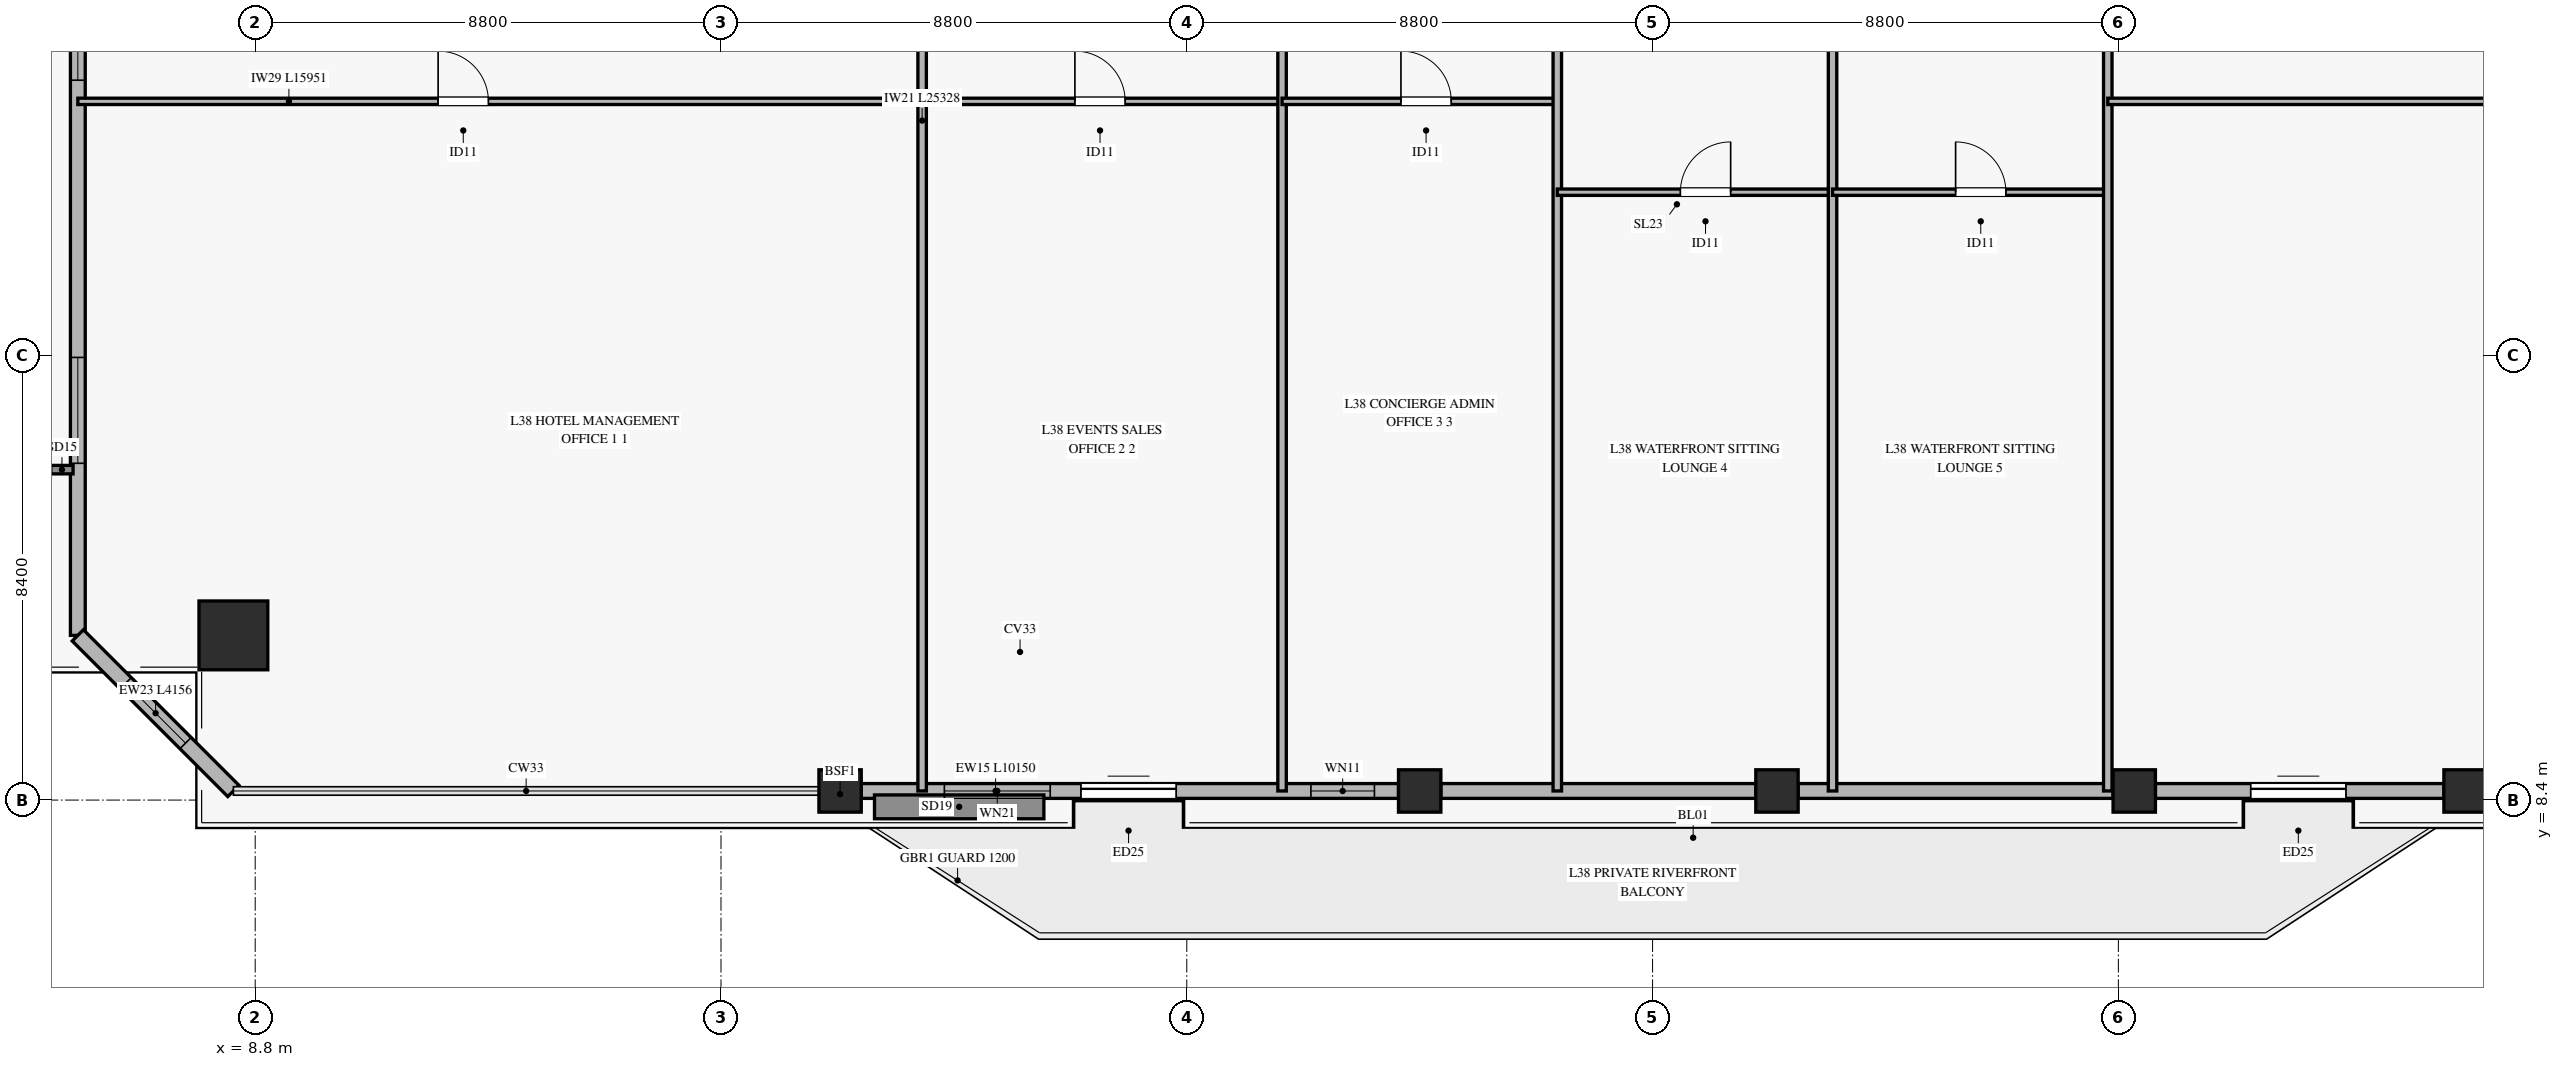
"""IFC4 building model, lengths in metres.
Left out: names, types, materials, properties, quantities, classifications, styles, units other than length and angle.
Written with IfcOpenShell. Run it as: python <this file> out.ifc"""

import sys

from ifc_helpers import new_model, si_unit, direction, frame, frame_2d, origin, origin_2d, place, context, subcontext, project, spatial, rectangle, hollow_rectangle, extrude, source, transform, mapped, element, fill, save


model = new_model("IFC4")
c1 = context("Model", 3, precision=1e-05, world=origin(), true_north=direction((0.0, 1.0)))
c2 = subcontext(c1, "Body", "Model", "MODEL_VIEW")
j1 = project(units=[si_unit("LENGTHUNIT", "METRE"), si_unit("PLANEANGLEUNIT", "RADIAN")], contexts=[c1])
p1 = place(None, origin())
s1 = spatial("IfcSite", under=j1, at=p1, CompositionType="ELEMENT")
p2 = place(p1, origin())
s2 = spatial("IfcBuilding", under=s1, at=p2, CompositionType="ELEMENT")
p3 = place(p2, frame((0.0, 0.0, 156.2)))
s3 = spatial("IfcBuildingStorey", under=s2, at=p3, CompositionType="ELEMENT", Elevation=156.2)
m1 = source(origin(), c2, "Body", "SweptSolid", [
    extrude(hollow_rectangle(XDim=1.3, YDim=1.3, WallThickness=0.06, at=origin_2d()), origin(), (0.0, 0.0, 1.0), 3.315),
])
p4 = place(p3, frame((8.388, 11.511, 0.0), z_axis=(0.063049281267, 0.150846878546, 0.986544478148), x_axis=(-0.922649834668, 0.385638798084, 0.0)))
e1 = element("IfcColumn", 1, at=p4, inside=s3, PredefinedType="COLUMN", context=c2, shape_type="MappedRepresentation", body=[
    mapped(m1, transform((0.0, 0.0, 0.0), x_axis=(1.0, 0.0, 0.0), y_axis=(0.0, 1.0, 0.0), z_axis=(0.0, 0.0, 1.0), scale=1.0)),
])
m2 = source(origin(), c2, "Body", "SweptSolid", [
    extrude(hollow_rectangle(XDim=0.8, YDim=0.8, WallThickness=0.036, at=origin_2d()), origin(), (0.0, 0.0, 1.0), 3.312),
])
for number, where, z_axis, x_axis in (
    (2, (19.85, 8.572, 0.0), (0.0, 0.159, 0.987), (-1.0, 0.0, 0.0)),
    (3, (30.8, 8.572, 0.0), (0.0, 0.159, 0.987), (-1.0, 0.0, 0.0)),
    (4, (37.55, 8.572, 0.0), (0.0, 0.159, 0.987), (-1.0, 0.0, 0.0)),
    (5, (44.3, 8.572, 0.0), (0.0, 0.159, 0.987), (-1.0, 0.0, 0.0)),
    (6, (50.55, 8.572, 0.0), (0.0, 0.159, 0.987), (-1.0, 0.0, 0.0)),
):
    element("IfcColumn", number, at=place(p3, frame(where, z_axis=z_axis, x_axis=x_axis)), inside=s3, PredefinedType="COLUMN", context=c2, shape_type="MappedRepresentation", body=[
        mapped(m2, transform((0.0, 0.0, 0.0), x_axis=(1.0, 0.0, 0.0), y_axis=(0.0, 1.0, 0.0), z_axis=(0.0, 0.0, 1.0), scale=1.0)),
    ])
p5 = place(p3, frame((20.25, 8.572, 0.0), z_axis=(0.0, 0.0, 1.0), x_axis=(1.0, 0.0, 0.0)))
e7 = element("IfcWall", 7, at=p5, inside=s3, PredefinedType="SOLIDWALL", context=c2, shape_type="SweptSolid", body=[
    extrude(rectangle(XDim=10.15, YDim=0.28, at=frame_2d((5.075, 0.0))), origin(), (0.0, 0.0, 1.0), 2.75),
])
p6 = place(p5, frame((4.15, 0.0, 0.0)))
e8 = element("IfcOpeningElement", 8, at=p6, cuts=e7, PredefinedType="OPENING", context=c2, shape_type="SweptSolid", body=[
    extrude(rectangle(XDim=1.8, YDim=2.25, at=frame_2d((0.9, 1.125))), frame((0.0, 0.15, 0.0), z_axis=(0.0, -1.0, 0.0), x_axis=(1.0, 0.0, 0.0)), (0.0, 0.0, 1.0), 0.3),
])
p7 = place(p5, frame((1.57, 0.0, 0.45)))
e9 = element("IfcOpeningElement", 9, at=p7, cuts=e7, PredefinedType="OPENING", context=c2, shape_type="SweptSolid", body=[
    extrude(rectangle(XDim=2.0, YDim=2.0, at=frame_2d((1.0, 1.0))), frame((0.0, 0.15, 0.0), z_axis=(0.0, -1.0, 0.0), x_axis=(1.0, 0.0, 0.0)), (0.0, 0.0, 1.0), 0.3),
])
p8 = place(p5, frame((8.495, 0.0, 0.45)))
e10 = element("IfcOpeningElement", 10, at=p8, cuts=e7, PredefinedType="OPENING", context=c2, shape_type="SweptSolid", body=[
    extrude(rectangle(XDim=1.2, YDim=2.0, at=frame_2d((0.6, 1.0))), frame((0.0, 0.15, 0.0), z_axis=(0.0, -1.0, 0.0), x_axis=(1.0, 0.0, 0.0)), (0.0, 0.0, 1.0), 0.3),
])
for number, where, z_axis, x_axis in (
    (11, (31.2, 8.572, 0.0), (0.0, 0.0, 1.0), (1.0, 0.0, 0.0)),
    (12, (37.95, 8.572, 0.0), (0.0, 0.0, 1.0), (1.0, 0.0, 0.0)),
):
    element("IfcWall", number, at=place(p3, frame(where, z_axis=z_axis, x_axis=x_axis)), inside=s3, PredefinedType="SOLIDWALL", context=c2, shape_type="SweptSolid", body=[
        extrude(rectangle(XDim=5.95, YDim=0.28, at=frame_2d((2.975, 0.0))), origin(), (0.0, 0.0, 1.0), 2.75),
    ])
p9 = place(p3, frame((44.7, 8.572, 0.0), z_axis=(0.0, 0.0, 1.0), x_axis=(1.0, 0.0, 0.0)))
e13 = element("IfcWall", 13, at=p9, inside=s3, PredefinedType="SOLIDWALL", context=c2, shape_type="SweptSolid", body=[
    extrude(rectangle(XDim=5.45, YDim=0.28, at=frame_2d((2.725, 0.0))), origin(), (0.0, 0.0, 1.0), 2.75),
])
p10 = place(p9, frame((1.8, 0.0, 0.0)))
e14 = element("IfcOpeningElement", 14, at=p10, cuts=e13, PredefinedType="OPENING", context=c2, shape_type="SweptSolid", body=[
    extrude(rectangle(XDim=1.8, YDim=2.25, at=frame_2d((0.9, 1.125))), frame((0.0, 0.15, 0.0), z_axis=(0.0, -1.0, 0.0), x_axis=(1.0, 0.0, 0.0)), (0.0, 0.0, 1.0), 0.3),
])
p11 = place(p3, frame((5.449, 11.511, 0.0), z_axis=(0.0, 0.0, 1.0), x_axis=(0.0, 1.0, 0.0)))
e15 = element("IfcWall", 15, at=p11, inside=s3, PredefinedType="SOLIDWALL", context=c2, shape_type="SweptSolid", body=[
    extrude(rectangle(XDim=15.425, YDim=0.28, at=frame_2d((7.712, 0.0))), origin(), (0.0, 0.0, 1.0), 2.75),
])
p12 = place(p11, frame((3.251, 0.0, 0.45)))
e16 = element("IfcOpeningElement", 16, at=p12, cuts=e15, PredefinedType="OPENING", context=c2, shape_type="SweptSolid", body=[
    extrude(rectangle(XDim=2.0, YDim=2.0, at=frame_2d((1.0, 1.0))), frame((0.0, 0.15, 0.0), z_axis=(0.0, -1.0, 0.0), x_axis=(1.0, 0.0, 0.0)), (0.0, 0.0, 1.0), 0.3),
])
p13 = place(p11, frame((10.488, 0.0, 0.45)))
e17 = element("IfcOpeningElement", 17, at=p13, cuts=e15, PredefinedType="OPENING", context=c2, shape_type="SweptSolid", body=[
    extrude(rectangle(XDim=2.0, YDim=2.0, at=frame_2d((1.0, 1.0))), frame((0.0, 0.15, 0.0), z_axis=(0.0, -1.0, 0.0), x_axis=(1.0, 0.0, 0.0)), (0.0, 0.0, 1.0), 0.3),
])
p14 = place(p3, frame((5.449, 11.511, 0.0), z_axis=(0.0, 0.0, 1.0), x_axis=(0.707106781187, -0.707106781187, 0.0)))
e18 = element("IfcWall", 18, at=p14, inside=s3, PredefinedType="SOLIDWALL", context=c2, shape_type="SweptSolid", body=[
    extrude(rectangle(XDim=4.156, YDim=0.3, at=frame_2d((2.078, 0.0))), origin(), (0.0, 0.0, 1.0), 2.75),
])
p15 = place(p14, frame((1.278, 0.0, 0.45)))
e19 = element("IfcOpeningElement", 19, at=p15, cuts=e18, PredefinedType="OPENING", context=c2, shape_type="SweptSolid", body=[
    extrude(rectangle(XDim=1.6, YDim=2.0, at=frame_2d((0.8, 1.0))), frame((0.0, 0.16, 0.0), z_axis=(0.0, -1.0, 0.0), x_axis=(1.0, 0.0, 0.0)), (0.0, 0.0, 1.0), 0.32),
])
p16 = place(p3, frame((5.449, 21.599, 0.0), z_axis=(0.0, 0.0, 1.0), x_axis=(1.0, 0.0, 0.0)))
e20 = element("IfcWall", 20, at=p16, inside=s3, PredefinedType="PARTITIONING", context=c2, shape_type="SweptSolid", body=[
    extrude(rectangle(XDim=15.951, YDim=0.12, at=frame_2d((7.976, 0.0))), origin(), (0.0, 0.0, 1.0), 2.455),
])
p17 = place(p16, frame((6.807, 0.0, 0.0)))
e21 = element("IfcOpeningElement", 21, at=p17, cuts=e20, PredefinedType="OPENING", context=c2, shape_type="SweptSolid", body=[
    extrude(rectangle(XDim=0.95, YDim=2.1, at=frame_2d((0.475, 1.05))), frame((0.0, 0.07, 0.0), z_axis=(0.0, -1.0, 0.0), x_axis=(1.0, 0.0, 0.0)), (0.0, 0.0, 1.0), 0.14),
])
p18 = place(p3, frame((21.4, 8.572, 0.0), z_axis=(0.0, 0.0, 1.0), x_axis=(0.0, 1.0, 0.0)))
e22 = element("IfcWall", 22, at=p18, inside=s3, PredefinedType="PARTITIONING", context=c2, shape_type="SweptSolid", body=[
    extrude(rectangle(XDim=25.328, YDim=0.16, at=frame_2d((12.664, 0.0))), origin(), (0.0, 0.0, 1.0), 2.755),
])
p19 = place(p3, frame((21.4, 21.599, 0.0), z_axis=(0.0, 0.0, 1.0), x_axis=(1.0, 0.0, 0.0)))
e23 = element("IfcWall", 23, at=p19, inside=s3, PredefinedType="PARTITIONING", context=c2, shape_type="SweptSolid", body=[
    extrude(rectangle(XDim=6.8, YDim=0.12, at=frame_2d((3.4, 0.0))), origin(), (0.0, 0.0, 1.0), 3.27),
])
p20 = place(p19, frame((2.886, 0.0, 0.0)))
e24 = element("IfcOpeningElement", 24, at=p20, cuts=e23, PredefinedType="OPENING", context=c2, shape_type="SweptSolid", body=[
    extrude(rectangle(XDim=0.95, YDim=2.1, at=frame_2d((0.475, 1.05))), frame((0.0, 0.07, 0.0), z_axis=(0.0, -1.0, 0.0), x_axis=(1.0, 0.0, 0.0)), (0.0, 0.0, 1.0), 0.14),
])
p21 = place(p3, frame((28.2, 8.572, 0.0), z_axis=(0.0, 0.0, 1.0), x_axis=(0.0, 1.0, 0.0)))
e25 = element("IfcWall", 25, at=p21, inside=s3, PredefinedType="PARTITIONING", context=c2, shape_type="SweptSolid", body=[
    extrude(rectangle(XDim=25.328, YDim=0.16, at=frame_2d((12.664, 0.0))), origin(), (0.0, 0.0, 1.0), 2.755),
])
p22 = place(p3, frame((28.2, 21.599, 0.0), z_axis=(0.0, 0.0, 1.0), x_axis=(1.0, 0.0, 0.0)))
e26 = element("IfcWall", 26, at=p22, inside=s3, PredefinedType="PARTITIONING", context=c2, shape_type="SweptSolid", body=[
    extrude(rectangle(XDim=5.2, YDim=0.12, at=frame_2d((2.6, 0.0))), origin(), (0.0, 0.0, 1.0), 2.455),
])
p23 = place(p22, frame((2.246, 0.0, 0.0)))
e27 = element("IfcOpeningElement", 27, at=p23, cuts=e26, PredefinedType="OPENING", context=c2, shape_type="SweptSolid", body=[
    extrude(rectangle(XDim=0.95, YDim=2.1, at=frame_2d((0.475, 1.05))), frame((0.0, 0.07, 0.0), z_axis=(0.0, -1.0, 0.0), x_axis=(1.0, 0.0, 0.0)), (0.0, 0.0, 1.0), 0.14),
])
p24 = place(p3, frame((33.4, 8.572, 0.0), z_axis=(0.0, 0.0, 1.0), x_axis=(0.0, 1.0, 0.0)))
e28 = element("IfcWall", 28, at=p24, inside=s3, PredefinedType="PARTITIONING", context=c2, shape_type="SweptSolid", body=[
    extrude(rectangle(XDim=25.328, YDim=0.16, at=frame_2d((12.664, 0.0))), origin(), (0.0, 0.0, 1.0), 2.755),
])
p25 = place(p3, frame((33.4, 19.883, 0.0), z_axis=(0.0, 0.0, 1.0), x_axis=(1.0, 0.0, 0.0)))
e29 = element("IfcWall", 29, at=p25, inside=s3, PredefinedType="PARTITIONING", context=c2, shape_type="SweptSolid", body=[
    extrude(rectangle(XDim=5.2, YDim=0.12, at=frame_2d((2.6, 0.0))), origin(), (0.0, 0.0, 1.0), 2.455),
])
p26 = place(p25, frame((2.325, 0.0, 0.0)))
e30 = element("IfcOpeningElement", 30, at=p26, cuts=e29, PredefinedType="OPENING", context=c2, shape_type="SweptSolid", body=[
    extrude(rectangle(XDim=0.95, YDim=2.1, at=frame_2d((0.475, 1.05))), frame((0.0, 0.07, 0.0), z_axis=(0.0, -1.0, 0.0), x_axis=(1.0, 0.0, 0.0)), (0.0, 0.0, 1.0), 0.14),
])
p27 = place(p3, frame((38.6, 8.572, 0.0), z_axis=(0.0, 0.0, 1.0), x_axis=(0.0, 1.0, 0.0)))
e31 = element("IfcWall", 31, at=p27, inside=s3, PredefinedType="PARTITIONING", context=c2, shape_type="SweptSolid", body=[
    extrude(rectangle(XDim=25.328, YDim=0.16, at=frame_2d((12.664, 0.0))), origin(), (0.0, 0.0, 1.0), 2.755),
])
p28 = place(p3, frame((38.6, 19.883, 0.0), z_axis=(0.0, 0.0, 1.0), x_axis=(1.0, 0.0, 0.0)))
e32 = element("IfcWall", 32, at=p28, inside=s3, PredefinedType="PARTITIONING", context=c2, shape_type="SweptSolid", body=[
    extrude(rectangle(XDim=5.2, YDim=0.12, at=frame_2d((2.6, 0.0))), origin(), (0.0, 0.0, 1.0), 3.27),
])
p29 = place(p28, frame((2.325, 0.0, 0.0)))
e33 = element("IfcOpeningElement", 33, at=p29, cuts=e32, PredefinedType="OPENING", context=c2, shape_type="SweptSolid", body=[
    extrude(rectangle(XDim=0.95, YDim=2.1, at=frame_2d((0.475, 1.05))), frame((0.0, 0.07, 0.0), z_axis=(0.0, -1.0, 0.0), x_axis=(1.0, 0.0, 0.0)), (0.0, 0.0, 1.0), 0.14),
])
p30 = place(p3, frame((43.8, 8.572, 0.0), z_axis=(0.0, 0.0, 1.0), x_axis=(0.0, 1.0, 0.0)))
e34 = element("IfcWall", 34, at=p30, inside=s3, PredefinedType="PARTITIONING", context=c2, shape_type="SweptSolid", body=[
    extrude(rectangle(XDim=25.328, YDim=0.16, at=frame_2d((12.664, 0.0))), origin(), (0.0, 0.0, 1.0), 2.755),
])
p31 = place(p3, frame((43.8, 21.599, 0.0), z_axis=(0.0, 0.0, 1.0), x_axis=(1.0, 0.0, 0.0)))
e35 = element("IfcWall", 35, at=p31, inside=s3, PredefinedType="PARTITIONING", context=c2, shape_type="SweptSolid", body=[
    extrude(rectangle(XDim=21.151, YDim=0.12, at=frame_2d((10.575, 0.0))), origin(), (0.0, 0.0, 1.0), 2.455),
])
p32 = place(p31, frame((8.452, 0.0, 0.0)))
e36 = element("IfcOpeningElement", 36, at=p32, cuts=e35, PredefinedType="OPENING", context=c2, shape_type="SweptSolid", body=[
    extrude(rectangle(XDim=0.95, YDim=2.1, at=frame_2d((0.475, 1.05))), frame((0.0, 0.07, 0.0), z_axis=(0.0, -1.0, 0.0), x_axis=(1.0, 0.0, 0.0)), (0.0, 0.0, 1.0), 0.14),
])
m3 = source(origin(), c2, "Body", "SweptSolid", [
    extrude(rectangle(XDim=1.8, YDim=2.25, at=frame_2d((0.9, 1.125))), frame((0.0, 0.025, 0.0), z_axis=(0.0, -1.0, 0.0), x_axis=(1.0, 0.0, 0.0)), (0.0, 0.0, 1.0), 0.05),
])
p33 = place(p6, origin())
e37 = element("IfcDoor", 37, at=p33, inside=s3, OperationType="SLIDING_TO_LEFT", PredefinedType="DOOR", context=c2, shape_type="MappedRepresentation", body=[
    mapped(m3, transform((0.0, 0.0, 0.0), x_axis=(1.0, 0.0, 0.0), y_axis=(0.0, 1.0, 0.0), z_axis=(0.0, 0.0, 1.0), scale=1.0)),
])
fill(e8, e37)
m4 = source(origin(), c2, "Body", "SweptSolid", [
    extrude(rectangle(XDim=2.0, YDim=2.0, at=frame_2d((1.0, 1.0))), frame((0.0, 0.03, 0.0), z_axis=(0.0, -1.0, 0.0), x_axis=(1.0, 0.0, 0.0)), (0.0, 0.0, 1.0), 0.06),
])
p34 = place(p7, origin())
e38 = element("IfcWindow", 38, at=p34, inside=s3, PartitioningType="SINGLE_PANEL", PredefinedType="WINDOW", context=c2, shape_type="MappedRepresentation", body=[
    mapped(m4, transform((0.0, 0.0, 0.0), x_axis=(1.0, 0.0, 0.0), y_axis=(0.0, 1.0, 0.0), z_axis=(0.0, 0.0, 1.0), scale=1.0)),
])
fill(e9, e38)
m5 = source(origin(), c2, "Body", "SweptSolid", [
    extrude(rectangle(XDim=1.2, YDim=2.0, at=frame_2d((0.6, 1.0))), frame((0.0, 0.03, 0.0), z_axis=(0.0, -1.0, 0.0), x_axis=(1.0, 0.0, 0.0)), (0.0, 0.0, 1.0), 0.06),
])
p35 = place(p8, origin())
e39 = element("IfcWindow", 39, at=p35, inside=s3, PartitioningType="SINGLE_PANEL", PredefinedType="WINDOW", context=c2, shape_type="MappedRepresentation", body=[
    mapped(m5, transform((0.0, 0.0, 0.0), x_axis=(1.0, 0.0, 0.0), y_axis=(0.0, 1.0, 0.0), z_axis=(0.0, 0.0, 1.0), scale=1.0)),
])
fill(e10, e39)
p36 = place(p10, origin())
e40 = element("IfcDoor", 40, at=p36, inside=s3, OperationType="SLIDING_TO_LEFT", PredefinedType="DOOR", context=c2, shape_type="MappedRepresentation", body=[
    mapped(m3, transform((0.0, 0.0, 0.0), x_axis=(1.0, 0.0, 0.0), y_axis=(0.0, 1.0, 0.0), z_axis=(0.0, 0.0, 1.0), scale=1.0)),
])
fill(e14, e40)
p37 = place(p12, origin())
e41 = element("IfcWindow", 41, at=p37, inside=s3, PartitioningType="SINGLE_PANEL", PredefinedType="WINDOW", context=c2, shape_type="MappedRepresentation", body=[
    mapped(m4, transform((0.0, 0.0, 0.0), x_axis=(1.0, 0.0, 0.0), y_axis=(0.0, 1.0, 0.0), z_axis=(0.0, 0.0, 1.0), scale=1.0)),
])
fill(e16, e41)
p38 = place(p13, origin())
e42 = element("IfcWindow", 42, at=p38, inside=s3, PartitioningType="SINGLE_PANEL", PredefinedType="WINDOW", context=c2, shape_type="MappedRepresentation", body=[
    mapped(m4, transform((0.0, 0.0, 0.0), x_axis=(1.0, 0.0, 0.0), y_axis=(0.0, 1.0, 0.0), z_axis=(0.0, 0.0, 1.0), scale=1.0)),
])
fill(e17, e42)
m6 = source(origin(), c2, "Body", "SweptSolid", [
    extrude(rectangle(XDim=1.6, YDim=2.0, at=frame_2d((0.8, 1.0))), frame((0.0, 0.03, 0.0), z_axis=(0.0, -1.0, 0.0), x_axis=(1.0, 0.0, 0.0)), (0.0, 0.0, 1.0), 0.06),
])
p39 = place(p15, origin())
e43 = element("IfcWindow", 43, at=p39, inside=s3, PartitioningType="SINGLE_PANEL", PredefinedType="WINDOW", context=c2, shape_type="MappedRepresentation", body=[
    mapped(m6, transform((0.0, 0.0, 0.0), x_axis=(1.0, 0.0, 0.0), y_axis=(0.0, 1.0, 0.0), z_axis=(0.0, 0.0, 1.0), scale=1.0)),
])
fill(e19, e43)
m7 = source(origin(), c2, "Body", "SweptSolid", [
    extrude(rectangle(XDim=0.95, YDim=2.1, at=frame_2d((0.475, 1.05))), frame((0.0, 0.025, 0.0), z_axis=(0.0, -1.0, 0.0), x_axis=(1.0, 0.0, 0.0)), (0.0, 0.0, 1.0), 0.05),
])
p40 = place(p17, origin())
e44 = element("IfcDoor", 44, at=p40, inside=s3, OperationType="SINGLE_SWING_LEFT", PredefinedType="DOOR", context=c2, shape_type="MappedRepresentation", body=[
    mapped(m7, transform((0.0, 0.0, 0.0), x_axis=(1.0, 0.0, 0.0), y_axis=(0.0, 1.0, 0.0), z_axis=(0.0, 0.0, 1.0), scale=1.0)),
])
fill(e21, e44)
p41 = place(p20, origin())
e45 = element("IfcDoor", 45, at=p41, inside=s3, OperationType="SINGLE_SWING_LEFT", PredefinedType="DOOR", context=c2, shape_type="MappedRepresentation", body=[
    mapped(m7, transform((0.0, 0.0, 0.0), x_axis=(1.0, 0.0, 0.0), y_axis=(0.0, 1.0, 0.0), z_axis=(0.0, 0.0, 1.0), scale=1.0)),
])
fill(e24, e45)
p42 = place(p23, origin())
e46 = element("IfcDoor", 46, at=p42, inside=s3, OperationType="SINGLE_SWING_LEFT", PredefinedType="DOOR", context=c2, shape_type="MappedRepresentation", body=[
    mapped(m7, transform((0.0, 0.0, 0.0), x_axis=(1.0, 0.0, 0.0), y_axis=(0.0, 1.0, 0.0), z_axis=(0.0, 0.0, 1.0), scale=1.0)),
])
fill(e27, e46)
p43 = place(p26, origin())
e47 = element("IfcDoor", 47, at=p43, inside=s3, OperationType="SINGLE_SWING_RIGHT", PredefinedType="DOOR", context=c2, shape_type="MappedRepresentation", body=[
    mapped(m7, transform((0.0, 0.0, 0.0), x_axis=(1.0, 0.0, 0.0), y_axis=(0.0, 1.0, 0.0), z_axis=(0.0, 0.0, 1.0), scale=1.0)),
])
fill(e30, e47)
p44 = place(p29, origin())
e48 = element("IfcDoor", 48, at=p44, inside=s3, OperationType="SINGLE_SWING_LEFT", PredefinedType="DOOR", context=c2, shape_type="MappedRepresentation", body=[
    mapped(m7, transform((0.0, 0.0, 0.0), x_axis=(1.0, 0.0, 0.0), y_axis=(0.0, 1.0, 0.0), z_axis=(0.0, 0.0, 1.0), scale=1.0)),
])
fill(e33, e48)
save(model, sys.argv[1])
